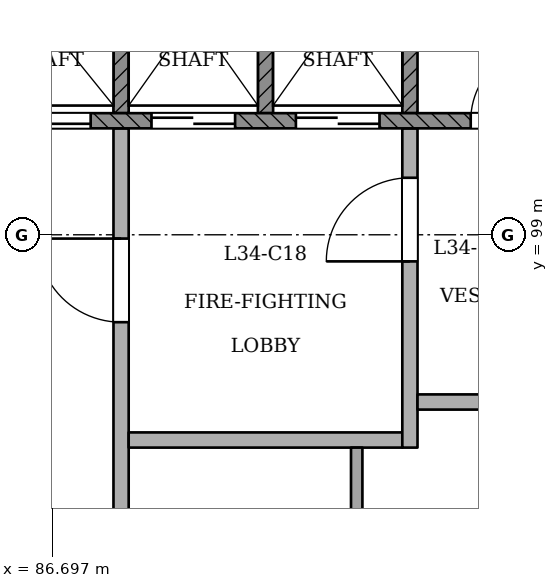
"""IFC4 building model, lengths in metres.
Left out: names, types, materials, properties, quantities, classifications, styles, units other than length and angle.
Written with IfcOpenShell. Run it as: python <this file> out.ifc"""

import sys

from ifc_helpers import new_model, si_unit, direction, frame, frame_2d, origin, place, context, subcontext, project, spatial, rectangle, extrude, element, fill, save


model = new_model("IFC4")
c1 = context("Model", 3, precision=1e-05, world=origin(), true_north=direction((0.0, 1.0)))
c2 = subcontext(c1, "Body", "Model", "MODEL_VIEW")
j1 = project(units=[si_unit("LENGTHUNIT", "METRE"), si_unit("PLANEANGLEUNIT", "RADIAN")], contexts=[c1])
p1 = place(None, origin())
s1 = spatial("IfcSite", under=j1, at=p1, CompositionType="ELEMENT")
p2 = place(p1, origin())
s2 = spatial("IfcBuilding", under=s1, at=p2, CompositionType="ELEMENT")
p3 = place(p2, frame((0.0, 0.0, 135.0)))
s3 = spatial("IfcBuildingStorey", under=s2, at=p3, CompositionType="ELEMENT", Elevation=135.0)
p4 = place(p3, frame((85.093, 63.473, 0.0), z_axis=(0.0, 0.0, 1.0), x_axis=(0.499997513821, 0.866026839176, 0.0)))
e1 = element("IfcWall", 1, at=p4, inside=s3, PredefinedType="PARTITIONING", context=c2, shape_type="SweptSolid", body=[
    extrude(rectangle(XDim=40.26, YDim=0.15, at=frame_2d((20.13, 0.0))), origin(), (0.0, 0.0, 1.0), 2.75),
])
p5 = place(p4, frame((0.429, 0.0, 0.0)))
e2 = element("IfcOpeningElement", 2, at=p5, cuts=e1, PredefinedType="OPENING", context=c2, shape_type="SweptSolid", body=[
    extrude(rectangle(XDim=1.2, YDim=2.1, at=frame_2d((0.6, 1.05))), frame((0.0, 0.085, 0.0), z_axis=(0.0, -1.0, 0.0), x_axis=(1.0, 0.0, 0.0)), (0.0, 0.0, 1.0), 0.171),
])
p6 = place(p4, frame((2.85, 0.0, 0.0)))
e3 = element("IfcOpeningElement", 3, at=p6, cuts=e1, PredefinedType="OPENING", context=c2, shape_type="SweptSolid", body=[
    extrude(rectangle(XDim=1.0, YDim=2.1, at=frame_2d((0.5, 1.05))), frame((0.0, 0.085, 0.0), z_axis=(0.0, -1.0, 0.0), x_axis=(1.0, 0.0, 0.0)), (0.0, 0.0, 1.0), 0.171),
])
p7 = place(p4, frame((8.28, 0.0, 0.0)))
e4 = element("IfcOpeningElement", 4, at=p7, cuts=e1, PredefinedType="OPENING", context=c2, shape_type="SweptSolid", body=[
    extrude(rectangle(XDim=1.2, YDim=2.1, at=frame_2d((0.6, 1.05))), frame((0.0, 0.085, 0.0), z_axis=(0.0, -1.0, 0.0), x_axis=(1.0, 0.0, 0.0)), (0.0, 0.0, 1.0), 0.171),
])
p8 = place(p4, frame((11.735, 0.0, 0.0)))
e5 = element("IfcOpeningElement", 5, at=p8, cuts=e1, PredefinedType="OPENING", context=c2, shape_type="SweptSolid", body=[
    extrude(rectangle(XDim=1.0, YDim=2.1, at=frame_2d((0.5, 1.05))), frame((0.0, 0.085, 0.0), z_axis=(0.0, -1.0, 0.0), x_axis=(1.0, 0.0, 0.0)), (0.0, 0.0, 1.0), 0.171),
])
p9 = place(p4, frame((18.41, 0.0, 0.0)))
e6 = element("IfcOpeningElement", 6, at=p9, cuts=e1, PredefinedType="OPENING", context=c2, shape_type="SweptSolid", body=[
    extrude(rectangle(XDim=1.0, YDim=2.1, at=frame_2d((0.5, 1.05))), frame((0.0, 0.085, 0.0), z_axis=(0.0, -1.0, 0.0), x_axis=(1.0, 0.0, 0.0)), (0.0, 0.0, 1.0), 0.171),
])
p10 = place(p4, frame((20.85, 0.0, 0.0)))
e7 = element("IfcOpeningElement", 7, at=p10, cuts=e1, PredefinedType="OPENING", context=c2, shape_type="SweptSolid", body=[
    extrude(rectangle(XDim=1.0, YDim=2.1, at=frame_2d((0.5, 1.05))), frame((0.0, 0.085, 0.0), z_axis=(0.0, -1.0, 0.0), x_axis=(1.0, 0.0, 0.0)), (0.0, 0.0, 1.0), 0.171),
])
p11 = place(p4, frame((26.38, 0.0, 0.0)))
e8 = element("IfcOpeningElement", 8, at=p11, cuts=e1, PredefinedType="OPENING", context=c2, shape_type="SweptSolid", body=[
    extrude(rectangle(XDim=1.0, YDim=2.1, at=frame_2d((0.5, 1.05))), frame((0.0, 0.085, 0.0), z_axis=(0.0, -1.0, 0.0), x_axis=(1.0, 0.0, 0.0)), (0.0, 0.0, 1.0), 0.171),
])
p12 = place(p4, frame((34.13, 0.0, 0.0)))
e9 = element("IfcOpeningElement", 9, at=p12, cuts=e1, PredefinedType="OPENING", context=c2, shape_type="SweptSolid", body=[
    extrude(rectangle(XDim=1.2, YDim=2.1, at=frame_2d((0.6, 1.05))), frame((0.0, 0.085, 0.0), z_axis=(0.0, -1.0, 0.0), x_axis=(1.0, 0.0, 0.0)), (0.0, 0.0, 1.0), 0.171),
])
p13 = place(p4, frame((38.86, 0.0, 0.0)))
e10 = element("IfcOpeningElement", 10, at=p13, cuts=e1, PredefinedType="OPENING", context=c2, shape_type="SweptSolid", body=[
    extrude(rectangle(XDim=1.2, YDim=2.1, at=frame_2d((0.6, 1.05))), frame((0.0, 0.085, 0.0), z_axis=(0.0, -1.0, 0.0), x_axis=(1.0, 0.0, 0.0)), (0.0, 0.0, 1.0), 0.171),
])
p14 = place(p3, frame((87.6, 93.4, 0.0), z_axis=(0.0, 0.0, 1.0), x_axis=(0.0, 1.0, 0.0)))
e11 = element("IfcWall", 11, at=p14, inside=s3, PredefinedType="PARTITIONING", context=c2, shape_type="SweptSolid", body=[
    extrude(rectangle(XDim=7.0, YDim=0.2, at=frame_2d((3.5, 0.0))), origin(), (0.0, 0.0, 1.0), 3.15),
])
p15 = place(p14, frame((4.45, 0.0, 0.0)))
e12 = element("IfcOpeningElement", 12, at=p15, cuts=e11, PredefinedType="OPENING", context=c2, shape_type="SweptSolid", body=[
    extrude(rectangle(XDim=1.1, YDim=2.1, at=frame_2d((0.55, 1.05))), frame((0.0, 0.11, 0.0), z_axis=(0.0, -1.0, 0.0), x_axis=(1.0, 0.0, 0.0)), (0.0, 0.0, 1.0), 0.221),
])
p16 = place(p3, frame((90.7, 93.4, 0.0), z_axis=(0.0, 0.0, 1.0), x_axis=(0.0, 1.0, 0.0)))
e13 = element("IfcWall", 13, at=p16, inside=s3, PredefinedType="PARTITIONING", context=c2, shape_type="SweptSolid", body=[
    extrude(rectangle(XDim=2.8, YDim=0.15, at=frame_2d((1.4, 0.0))), origin(), (0.0, 0.0, 1.0), 3.15),
])
p17 = place(p3, frame((87.7, 96.3, 0.0), z_axis=(0.0, 0.0, 1.0), x_axis=(1.0, 0.0, 0.0)))
e14 = element("IfcWall", 14, at=p17, inside=s3, PredefinedType="PARTITIONING", context=c2, shape_type="SweptSolid", body=[
    extrude(rectangle(XDim=3.6, YDim=0.2, at=frame_2d((1.8, 0.0))), origin(), (0.0, 0.0, 1.0), 3.15),
])
p18 = place(p3, frame((91.4, 96.2, 0.0), z_axis=(0.0, 0.0, 1.0), x_axis=(0.0, 1.0, 0.0)))
e15 = element("IfcWall", 15, at=p18, inside=s3, PredefinedType="PARTITIONING", context=c2, shape_type="SweptSolid", body=[
    extrude(rectangle(XDim=4.2, YDim=0.2, at=frame_2d((2.1, 0.0))), origin(), (0.0, 0.0, 1.0), 3.15),
])
p19 = place(p18, frame((2.45, 0.0, 0.0)))
e16 = element("IfcOpeningElement", 16, at=p19, cuts=e15, PredefinedType="OPENING", context=c2, shape_type="SweptSolid", body=[
    extrude(rectangle(XDim=1.1, YDim=2.1, at=frame_2d((0.55, 1.05))), frame((0.0, 0.11, 0.0), z_axis=(0.0, -1.0, 0.0), x_axis=(1.0, 0.0, 0.0)), (0.0, 0.0, 1.0), 0.221),
])
p20 = place(p3, frame((91.5, 96.8, 0.0), z_axis=(0.0, 0.0, 1.0), x_axis=(1.0, 0.0, 0.0)))
e17 = element("IfcWall", 17, at=p20, inside=s3, PredefinedType="PARTITIONING", context=c2, shape_type="SweptSolid", body=[
    extrude(rectangle(XDim=2.4, YDim=0.2, at=frame_2d((1.2, 0.0))), origin(), (0.0, 0.0, 1.0), 3.15),
])
p21 = place(p3, frame((75.9, 100.5, 0.0), z_axis=(0.0, 0.0, 1.0), x_axis=(1.0, 0.0, 0.0)))
e18 = element("IfcWall", 18, at=p21, inside=s3, PredefinedType="SOLIDWALL", context=c2, shape_type="SweptSolid", body=[
    extrude(rectangle(XDim=18.2, YDim=0.2, at=frame_2d((9.1, 0.0))), origin(), (0.0, 0.0, 1.0), 3.15),
])
p22 = place(p21, frame((2.6, 0.0, 0.0)))
e19 = element("IfcOpeningElement", 19, at=p22, cuts=e18, PredefinedType="OPENING", context=c2, shape_type="SweptSolid", body=[
    extrude(rectangle(XDim=1.1, YDim=2.1, at=frame_2d((0.55, 1.05))), frame((0.0, 0.11, 0.0), z_axis=(0.0, -1.0, 0.0), x_axis=(1.0, 0.0, 0.0)), (0.0, 0.0, 1.0), 0.221),
])
p23 = place(p21, frame((4.5, 0.0, 0.0)))
e20 = element("IfcOpeningElement", 20, at=p23, cuts=e18, PredefinedType="OPENING", context=c2, shape_type="SweptSolid", body=[
    extrude(rectangle(XDim=1.1, YDim=2.1, at=frame_2d((0.55, 1.05))), frame((0.0, 0.11, 0.0), z_axis=(0.0, -1.0, 0.0), x_axis=(1.0, 0.0, 0.0)), (0.0, 0.0, 1.0), 0.221),
])
p24 = place(p21, frame((6.4, 0.0, 0.0)))
e21 = element("IfcOpeningElement", 21, at=p24, cuts=e18, PredefinedType="OPENING", context=c2, shape_type="SweptSolid", body=[
    extrude(rectangle(XDim=1.1, YDim=2.1, at=frame_2d((0.55, 1.05))), frame((0.0, 0.11, 0.0), z_axis=(0.0, -1.0, 0.0), x_axis=(1.0, 0.0, 0.0)), (0.0, 0.0, 1.0), 0.221),
])
p25 = place(p21, frame((8.3, 0.0, 0.0)))
e22 = element("IfcOpeningElement", 22, at=p25, cuts=e18, PredefinedType="OPENING", context=c2, shape_type="SweptSolid", body=[
    extrude(rectangle(XDim=1.1, YDim=2.1, at=frame_2d((0.55, 1.05))), frame((0.0, 0.11, 0.0), z_axis=(0.0, -1.0, 0.0), x_axis=(1.0, 0.0, 0.0)), (0.0, 0.0, 1.0), 0.221),
])
p26 = place(p21, frame((10.2, 0.0, 0.0)))
e23 = element("IfcOpeningElement", 23, at=p26, cuts=e18, PredefinedType="OPENING", context=c2, shape_type="SweptSolid", body=[
    extrude(rectangle(XDim=1.1, YDim=2.1, at=frame_2d((0.55, 1.05))), frame((0.0, 0.11, 0.0), z_axis=(0.0, -1.0, 0.0), x_axis=(1.0, 0.0, 0.0)), (0.0, 0.0, 1.0), 0.221),
])
p27 = place(p21, frame((12.1, 0.0, 0.0)))
e24 = element("IfcOpeningElement", 24, at=p27, cuts=e18, PredefinedType="OPENING", context=c2, shape_type="SweptSolid", body=[
    extrude(rectangle(XDim=1.1, YDim=2.1, at=frame_2d((0.55, 1.05))), frame((0.0, 0.11, 0.0), z_axis=(0.0, -1.0, 0.0), x_axis=(1.0, 0.0, 0.0)), (0.0, 0.0, 1.0), 0.221),
])
p28 = place(p21, frame((14.0, 0.0, 0.0)))
e25 = element("IfcOpeningElement", 25, at=p28, cuts=e18, PredefinedType="OPENING", context=c2, shape_type="SweptSolid", body=[
    extrude(rectangle(XDim=1.1, YDim=2.1, at=frame_2d((0.55, 1.05))), frame((0.0, 0.11, 0.0), z_axis=(0.0, -1.0, 0.0), x_axis=(1.0, 0.0, 0.0)), (0.0, 0.0, 1.0), 0.221),
])
p29 = place(p21, frame((0.65, 0.0, 0.0)))
e26 = element("IfcOpeningElement", 26, at=p29, cuts=e18, PredefinedType="OPENING", context=c2, shape_type="SweptSolid", body=[
    extrude(rectangle(XDim=1.0, YDim=2.1, at=frame_2d((0.5, 1.05))), frame((0.0, 0.11, 0.0), z_axis=(0.0, -1.0, 0.0), x_axis=(1.0, 0.0, 0.0)), (0.0, 0.0, 1.0), 0.221),
])
p30 = place(p21, frame((16.3, 0.0, 0.0)))
e27 = element("IfcOpeningElement", 27, at=p30, cuts=e18, PredefinedType="OPENING", context=c2, shape_type="SweptSolid", body=[
    extrude(rectangle(XDim=1.0, YDim=2.1, at=frame_2d((0.5, 1.05))), frame((0.0, 0.11, 0.0), z_axis=(0.0, -1.0, 0.0), x_axis=(1.0, 0.0, 0.0)), (0.0, 0.0, 1.0), 0.221),
])
for number, where, z_axis, x_axis in (
    (28, (87.6, 100.6, 0.0), (0.0, 0.0, 1.0), (0.0, 1.0, 0.0)),
    (29, (89.5, 100.6, 0.0), (0.0, 0.0, 1.0), (0.0, 1.0, 0.0)),
    (30, (91.4, 100.6, 0.0), (0.0, 0.0, 1.0), (0.0, 1.0, 0.0)),
):
    element("IfcWall", number, at=place(p3, frame(where, z_axis=z_axis, x_axis=x_axis)), inside=s3, PredefinedType="SOLIDWALL", context=c2, shape_type="SweptSolid", body=[
        extrude(rectangle(XDim=2.8, YDim=0.2, at=frame_2d((1.4, 0.0))), origin(), (0.0, 0.0, 1.0), 3.15),
    ])
p31 = place(p26, origin())
e31 = element("IfcDoor", 31, at=p31, inside=s3, OperationType="SLIDING_TO_RIGHT", PredefinedType="NOTDEFINED", context=c2, shape_type="SweptSolid", body=[
    extrude(rectangle(XDim=1.1, YDim=2.1, at=frame_2d((0.55, 1.05))), frame((0.0, 0.025, 0.0), z_axis=(0.0, -1.0, 0.0), x_axis=(1.0, 0.0, 0.0)), (0.0, 0.0, 1.0), 0.05),
])
fill(e23, e31)
p32 = place(p27, origin())
e32 = element("IfcDoor", 32, at=p32, inside=s3, OperationType="SLIDING_TO_RIGHT", PredefinedType="NOTDEFINED", context=c2, shape_type="SweptSolid", body=[
    extrude(rectangle(XDim=1.1, YDim=2.1, at=frame_2d((0.55, 1.05))), frame((0.0, 0.025, 0.0), z_axis=(0.0, -1.0, 0.0), x_axis=(1.0, 0.0, 0.0)), (0.0, 0.0, 1.0), 0.05),
])
fill(e24, e32)
p33 = place(p28, origin())
e33 = element("IfcDoor", 33, at=p33, inside=s3, OperationType="SLIDING_TO_LEFT", PredefinedType="NOTDEFINED", context=c2, shape_type="SweptSolid", body=[
    extrude(rectangle(XDim=1.1, YDim=2.1, at=frame_2d((0.55, 1.05))), frame((0.0, 0.025, 0.0), z_axis=(0.0, -1.0, 0.0), x_axis=(1.0, 0.0, 0.0)), (0.0, 0.0, 1.0), 0.05),
])
fill(e25, e33)
p34 = place(p15, origin())
e34 = element("IfcDoor", 34, at=p34, inside=s3, OperationType="SINGLE_SWING_RIGHT", PredefinedType="NOTDEFINED", context=c2, shape_type="SweptSolid", body=[
    extrude(rectangle(XDim=1.1, YDim=2.1, at=frame_2d((0.55, 1.05))), frame((0.0, 0.025, 0.0), z_axis=(0.0, -1.0, 0.0), x_axis=(1.0, 0.0, 0.0)), (0.0, 0.0, 1.0), 0.05),
])
fill(e12, e34)
p35 = place(p19, origin())
e35 = element("IfcDoor", 35, at=p35, inside=s3, OperationType="SINGLE_SWING_LEFT", PredefinedType="NOTDEFINED", context=c2, shape_type="SweptSolid", body=[
    extrude(rectangle(XDim=1.1, YDim=2.1, at=frame_2d((0.55, 1.05))), frame((0.0, 0.025, 0.0), z_axis=(0.0, -1.0, 0.0), x_axis=(1.0, 0.0, 0.0)), (0.0, 0.0, 1.0), 0.05),
])
fill(e16, e35)
p36 = place(p30, origin())
e36 = element("IfcDoor", 36, at=p36, inside=s3, OperationType="SINGLE_SWING_RIGHT", PredefinedType="NOTDEFINED", context=c2, shape_type="SweptSolid", body=[
    extrude(rectangle(XDim=1.0, YDim=2.1, at=frame_2d((0.5, 1.05))), frame((0.0, 0.025, 0.0), z_axis=(0.0, -1.0, 0.0), x_axis=(1.0, 0.0, 0.0)), (0.0, 0.0, 1.0), 0.05),
])
fill(e27, e36)
save(model, sys.argv[1])
